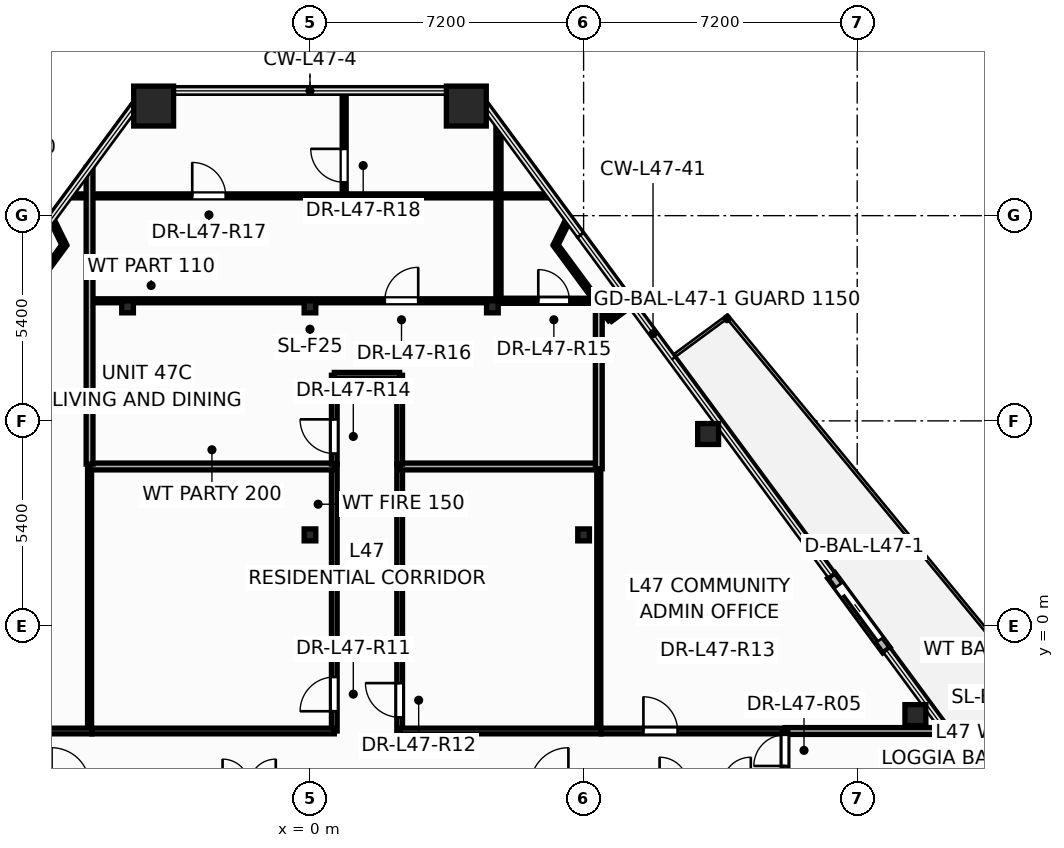
"""IFC4 building model, lengths in metres.
Left out: names, types, materials, properties, quantities, classifications, styles, units other than length and angle.
Written with IfcOpenShell. Run it as: python <this file> out.ifc"""

import sys

from ifc_helpers import new_model, si_unit, direction, frame, frame_2d, origin, origin_2d, place, context, subcontext, project, spatial, rectangle, hollow_rectangle, hollow_circle, i_section, extrude, element, fill, save


model = new_model("IFC4")
c1 = context("Model", 3, precision=1e-05, world=origin(), true_north=direction((0.0, 1.0)))
c2 = subcontext(c1, "Body", "Model", "MODEL_VIEW")
j1 = project(units=[si_unit("LENGTHUNIT", "METRE"), si_unit("PLANEANGLEUNIT", "RADIAN")], contexts=[c1])
p1 = place(None, origin())
s1 = spatial("IfcSite", under=j1, at=p1, CompositionType="ELEMENT")
p2 = place(p1, origin())
s2 = spatial("IfcBuilding", under=s1, at=p2, CompositionType="ELEMENT")
p3 = place(p2, frame((0.0, 0.0, 182.1)))
s3 = spatial("IfcBuildingStorey", under=s2, at=p3, CompositionType="ELEMENT", Elevation=182.1)
for number, where, z_axis, x_axis in (
    (1, (4.114, 13.684, 0.0), (0.0, 0.0, 1.0), (1.0, 0.0, 0.0)),
    (2, (-4.114, 13.684, 0.0), (0.0, 0.0, 1.0), (1.0, 0.0, 0.0)),
):
    element("IfcColumn", number, at=place(p3, frame(where, z_axis=z_axis, x_axis=x_axis)), inside=s3, PredefinedType="COLUMN", context=c2, shape_type="SweptSolid", body=[
        extrude(hollow_rectangle(XDim=1.05, YDim=1.05, WallThickness=0.045, at=origin_2d()), origin(), (0.0, 0.0, 1.0), 3.6),
    ])
for number, where, z_axis, x_axis in (
    (3, (15.931, -2.341, 0.0), (0.0, 0.0, 1.0), (1.0, 0.0, 0.0)),
    (4, (10.477, 5.055, 0.0), (0.0, 0.0, 1.0), (1.0, 0.0, 0.0)),
):
    element("IfcColumn", number, at=place(p3, frame(where, z_axis=z_axis, x_axis=x_axis)), inside=s3, PredefinedType="COLUMN", context=c2, shape_type="SweptSolid", body=[
        extrude(hollow_circle(Radius=0.275, WallThickness=0.024, at=origin_2d()), origin(), (0.0, 0.0, 1.0), 3.6),
    ])
for number, where, z_axis, x_axis in (
    (5, (0.0, 2.4, 0.0), (0.0, 0.0, 1.0), (1.0, 0.0, 0.0)),
    (6, (7.2, 2.4, 0.0), (0.0, 0.0, 1.0), (1.0, 0.0, 0.0)),
    (7, (-4.8, 8.4, 0.0), (0.0, 0.0, 1.0), (1.0, 0.0, 0.0)),
    (8, (0.0, 8.4, 0.0), (0.0, 0.0, 1.0), (1.0, 0.0, 0.0)),
    (9, (4.8, 8.4, 0.0), (0.0, 0.0, 1.0), (1.0, 0.0, 0.0)),
):
    element("IfcColumn", number, at=place(p3, frame(where, z_axis=z_axis, x_axis=x_axis)), inside=s3, PredefinedType="COLUMN", context=c2, shape_type="SweptSolid", body=[
        extrude(i_section(OverallWidth=0.307, OverallDepth=0.314, WebThickness=0.012, FlangeThickness=0.019, at=origin_2d()), origin(), (0.0, 0.0, 1.0), 3.6),
    ])
p4 = place(p3, frame((15.168, -0.633, -0.015), z_axis=(0.0, 0.0, 1.0), x_axis=(-0.593448168385, 0.804872208142, 0.0)))
e10 = element("IfcWall", 10, at=p4, inside=s3, PredefinedType="STANDARD", context=c2, shape_type="SweptSolid", body=[
    extrude(rectangle(XDim=2.44, YDim=0.24, at=frame_2d((1.22, 0.0))), origin(), (0.0, 0.0, 1.0), 2.807),
])
p5 = place(p4, frame((0.32, 0.0, 0.015)))
e11 = element("IfcOpeningElement", 11, at=p5, cuts=e10, PredefinedType="OPENING", context=c2, shape_type="SweptSolid", body=[
    extrude(rectangle(XDim=1.806, YDim=2.204, at=frame_2d((0.9, 1.102))), frame((0.0, 0.13, 0.0), z_axis=(0.0, -1.0, 0.0), x_axis=(1.0, 0.0, 0.0)), (0.0, 0.0, 1.0), 0.26),
])
p6 = place(p3, frame((-5.8, 8.56, 0.0), z_axis=(0.0, 0.0, 1.0), x_axis=(1.0, 0.0, 0.0)))
e12 = element("IfcWall", 12, at=p6, inside=s3, PredefinedType="PARTITIONING", context=c2, shape_type="SweptSolid", body=[
    extrude(rectangle(XDim=10.8, YDim=0.105, at=frame_2d((5.4, 0.0))), origin(), (0.0, 0.0, 1.0), 2.325),
])
p7 = place(p6, frame((7.768, 0.0, 0.0)))
e13 = element("IfcOpeningElement", 13, at=p7, cuts=e12, PredefinedType="OPENING", context=c2, shape_type="SweptSolid", body=[
    extrude(rectangle(XDim=0.886, YDim=2.104, at=frame_2d((0.44, 1.052))), frame((0.0, 0.062, 0.0), z_axis=(0.0, -1.0, 0.0), x_axis=(1.0, 0.0, 0.0)), (0.0, 0.0, 1.0), 0.125),
])
p8 = place(p3, frame((-6.354, 11.32, 0.0), z_axis=(0.0, 0.0, 1.0), x_axis=(1.0, 0.0, 0.0)))
e14 = element("IfcWall", 14, at=p8, inside=s3, PredefinedType="PARTITIONING", context=c2, shape_type="SweptSolid", body=[
    extrude(rectangle(XDim=7.314, YDim=0.105, at=frame_2d((3.657, 0.0))), origin(), (0.0, 0.0, 1.0), 2.325),
])
p9 = place(p8, frame((3.256, 0.0, 0.0)))
e15 = element("IfcOpeningElement", 15, at=p9, cuts=e14, PredefinedType="OPENING", context=c2, shape_type="SweptSolid", body=[
    extrude(rectangle(XDim=0.886, YDim=2.104, at=frame_2d((0.44, 1.052))), frame((0.0, 0.062, 0.0), z_axis=(0.0, -1.0, 0.0), x_axis=(1.0, 0.0, 0.0)), (0.0, 0.0, 1.0), 0.125),
])
p10 = place(p3, frame((0.64, -2.76, 0.0), z_axis=(0.0, 0.0, 1.0), x_axis=(0.0, 1.0, 0.0)))
e16 = element("IfcWall", 16, at=p10, inside=s3, PredefinedType="PARTITIONING", context=c2, shape_type="SweptSolid", body=[
    extrude(rectangle(XDim=7.02, YDim=0.15, at=frame_2d((3.51, 0.0))), origin(), (0.0, 0.0, 1.0), 2.325),
])
p11 = place(p10, frame((0.52, 0.0, 0.0)))
e17 = element("IfcOpeningElement", 17, at=p11, cuts=e16, PredefinedType="OPENING", context=c2, shape_type="SweptSolid", body=[
    extrude(rectangle(XDim=0.906, YDim=2.104, at=frame_2d((0.45, 1.052))), frame((0.0, 0.085, 0.0), z_axis=(0.0, -1.0, 0.0), x_axis=(1.0, 0.0, 0.0)), (0.0, 0.0, 1.0), 0.17),
])
p12 = place(p3, frame((2.36, -2.76, 0.0), z_axis=(0.0, 0.0, 1.0), x_axis=(0.0, 1.0, 0.0)))
e18 = element("IfcWall", 18, at=p12, inside=s3, PredefinedType="PARTITIONING", context=c2, shape_type="SweptSolid", body=[
    extrude(rectangle(XDim=7.02, YDim=0.15, at=frame_2d((3.51, 0.0))), origin(), (0.0, 0.0, 1.0), 2.325),
])
p13 = place(p12, frame((0.36, 0.0, 0.0)))
e19 = element("IfcOpeningElement", 19, at=p13, cuts=e18, PredefinedType="OPENING", context=c2, shape_type="SweptSolid", body=[
    extrude(rectangle(XDim=0.906, YDim=2.104, at=frame_2d((0.45, 1.052))), frame((0.0, 0.085, 0.0), z_axis=(0.0, -1.0, 0.0), x_axis=(1.0, 0.0, 0.0)), (0.0, 0.0, 1.0), 0.17),
])
p14 = place(p3, frame((-5.8, -2.76, 0.0), z_axis=(0.0, 0.0, 1.0), x_axis=(0.0, 1.0, 0.0)))
e20 = element("IfcWall", 20, at=p14, inside=s3, PredefinedType="PARTITIONING", context=c2, shape_type="SweptSolid", body=[
    extrude(rectangle(XDim=7.02, YDim=0.105, at=frame_2d((3.51, 0.0))), origin(), (0.0, 0.0, 1.0), 2.325),
])
p15 = place(p3, frame((7.6, -2.76, 0.0), z_axis=(0.0, 0.0, 1.0), x_axis=(0.0, 1.0, 0.0)))
e21 = element("IfcWall", 21, at=p15, inside=s3, PredefinedType="PARTITIONING", context=c2, shape_type="SweptSolid", body=[
    extrude(rectangle(XDim=6.96, YDim=0.105, at=frame_2d((3.48, 0.0))), origin(), (0.0, 0.0, 1.0), 2.325),
])
p16 = place(p3, frame((-12.5, -2.76, 0.0), z_axis=(0.0, 0.0, 1.0), x_axis=(1.0, 0.0, 0.0)))
e22 = element("IfcWall", 22, at=p16, inside=s3, PredefinedType="PARTITIONING", context=c2, shape_type="SweptSolid", body=[
    extrude(rectangle(XDim=6.76, YDim=0.15, at=frame_2d((3.38, 0.0))), origin(), (0.0, 0.0, 1.0), 2.325),
])
p17 = place(p16, frame((1.675, 0.0, 0.0)))
e23 = element("IfcOpeningElement", 23, at=p17, cuts=e22, PredefinedType="OPENING", context=c2, shape_type="SweptSolid", body=[
    extrude(rectangle(XDim=0.906, YDim=2.104, at=frame_2d((0.45, 1.052))), frame((0.0, 0.085, 0.0), z_axis=(0.0, -1.0, 0.0), x_axis=(1.0, 0.0, 0.0)), (0.0, 0.0, 1.0), 0.17),
])
p18 = place(p3, frame((-5.738, -2.76, 0.0), z_axis=(0.0, 0.0, 1.0), x_axis=(1.0, 0.0, 0.0)))
e24 = element("IfcWall", 24, at=p18, inside=s3, PredefinedType="PARTITIONING", context=c2, shape_type="SweptSolid", body=[
    extrude(rectangle(XDim=6.378, YDim=0.15, at=frame_2d((3.189, 0.0))), origin(), (0.0, 0.0, 1.0), 2.325),
])
p19 = place(p3, frame((-5.8, 4.2, 0.0), z_axis=(0.0, 0.0, 1.0), x_axis=(1.0, 0.0, 0.0)))
e25 = element("IfcWall", 25, at=p19, inside=s3, PredefinedType="PARTITIONING", context=c2, shape_type="SweptSolid", body=[
    extrude(rectangle(XDim=6.44, YDim=0.18, at=frame_2d((3.22, 0.0))), origin(), (0.0, 0.0, 1.0), 2.325),
])
p20 = place(p3, frame((0.962, 11.32, 0.0), z_axis=(0.0, 0.0, 1.0), x_axis=(1.0, 0.0, 0.0)))
e26 = element("IfcWall", 26, at=p20, inside=s3, PredefinedType="PARTITIONING", context=c2, shape_type="SweptSolid", body=[
    extrude(rectangle(XDim=5.392, YDim=0.105, at=frame_2d((2.696, 0.0))), origin(), (0.0, 0.0, 1.0), 2.325),
])
p21 = place(p3, frame((2.36, -2.76, 0.0), z_axis=(0.0, 0.0, 1.0), x_axis=(1.0, 0.0, 0.0)))
e27 = element("IfcWall", 27, at=p21, inside=s3, PredefinedType="PARTITIONING", context=c2, shape_type="SweptSolid", body=[
    extrude(rectangle(XDim=5.3, YDim=0.15, at=frame_2d((2.65, 0.0))), origin(), (0.0, 0.0, 1.0), 2.325),
])
p22 = place(p3, frame((2.36, 4.2, 0.0), z_axis=(0.0, 0.0, 1.0), x_axis=(1.0, 0.0, 0.0)))
e28 = element("IfcWall", 28, at=p22, inside=s3, PredefinedType="PARTITIONING", context=c2, shape_type="SweptSolid", body=[
    extrude(rectangle(XDim=5.24, YDim=0.18, at=frame_2d((2.62, 0.0))), origin(), (0.0, 0.0, 1.0), 2.325),
])
p23 = place(p3, frame((7.662, -2.76, 0.0), z_axis=(0.0, 0.0, 1.0), x_axis=(1.0, 0.0, 0.0)))
e29 = element("IfcWall", 29, at=p23, inside=s3, PredefinedType="PARTITIONING", context=c2, shape_type="SweptSolid", body=[
    extrude(rectangle(XDim=4.838, YDim=0.15, at=frame_2d((2.419, 0.0))), origin(), (0.0, 0.0, 1.0), 3.35),
])
p24 = place(p23, frame((1.112, 0.0, 0.0)))
e30 = element("IfcOpeningElement", 30, at=p24, cuts=e29, PredefinedType="OPENING", context=c2, shape_type="SweptSolid", body=[
    extrude(rectangle(XDim=0.906, YDim=2.104, at=frame_2d((0.45, 1.052))), frame((0.0, 0.085, 0.0), z_axis=(0.0, -1.0, 0.0), x_axis=(1.0, 0.0, 0.0)), (0.0, 0.0, 1.0), 0.17),
])
p25 = place(p3, frame((4.96, 8.56, 0.0), z_axis=(0.0, 0.0, 1.0), x_axis=(0.0, 1.0, 0.0)))
e31 = element("IfcWall", 31, at=p25, inside=s3, PredefinedType="PARTITIONING", context=c2, shape_type="SweptSolid", body=[
    extrude(rectangle(XDim=4.65, YDim=0.135, at=frame_2d((2.325, 0.0))), origin(), (0.0, 0.0, 1.0), 2.325),
])
p26 = place(p3, frame((7.6, 4.14, 0.0), z_axis=(0.0, 0.0, 1.0), x_axis=(0.0, 1.0, 0.0)))
e32 = element("IfcWall", 32, at=p26, inside=s3, PredefinedType="PARTITIONING", context=c2, shape_type="SweptSolid", body=[
    extrude(rectangle(XDim=4.56, YDim=0.18, at=frame_2d((2.28, 0.0))), origin(), (0.0, 0.0, 1.0), 2.325),
])
p27 = place(p3, frame((-5.8, 4.262, 0.0), z_axis=(0.0, 0.0, 1.0), x_axis=(0.0, 1.0, 0.0)))
e33 = element("IfcWall", 33, at=p27, inside=s3, PredefinedType="PARTITIONING", context=c2, shape_type="SweptSolid", body=[
    extrude(rectangle(XDim=7.809, YDim=0.18, at=frame_2d((3.905, 0.0))), origin(), (0.0, 0.0, 1.0), 2.325),
])
p28 = place(p3, frame((12.5, -2.76, 0.0), z_axis=(0.0, 0.0, 1.0), x_axis=(1.0, 0.0, 0.0)))
e34 = element("IfcWall", 34, at=p28, inside=s3, PredefinedType="PARTITIONING", context=c2, shape_type="SweptSolid", body=[
    extrude(rectangle(XDim=4.237, YDim=0.18, at=frame_2d((2.118, 0.0))), origin(), (0.0, 0.0, 1.0), 2.325),
])
p29 = place(p3, frame((5.002, 8.56, 0.0), z_axis=(0.0, 0.0, 1.0), x_axis=(1.0, 0.0, 0.0)))
e35 = element("IfcWall", 35, at=p29, inside=s3, PredefinedType="PARTITIONING", context=c2, shape_type="SweptSolid", body=[
    extrude(rectangle(XDim=2.758, YDim=0.135, at=frame_2d((1.379, 0.0))), origin(), (0.0, 0.0, 1.0), 2.325),
])
p30 = place(p29, frame((1.006, 0.0, 0.0)))
e36 = element("IfcOpeningElement", 36, at=p30, cuts=e35, PredefinedType="OPENING", context=c2, shape_type="SweptSolid", body=[
    extrude(rectangle(XDim=0.826, YDim=2.104, at=frame_2d((0.41, 1.052))), frame((0.0, 0.078, 0.0), z_axis=(0.0, -1.0, 0.0), x_axis=(1.0, 0.0, 0.0)), (0.0, 0.0, 1.0), 0.155),
])
p31 = place(p3, frame((0.9, 11.32, 0.0), z_axis=(0.0, 0.0, 1.0), x_axis=(0.0, 1.0, 0.0)))
e37 = element("IfcWall", 37, at=p31, inside=s3, PredefinedType="PARTITIONING", context=c2, shape_type="SweptSolid", body=[
    extrude(rectangle(XDim=2.763, YDim=0.105, at=frame_2d((1.382, 0.0))), origin(), (0.0, 0.0, 1.0), 2.325),
])
p32 = place(p31, frame((0.358, 0.0, 0.0)))
e38 = element("IfcOpeningElement", 38, at=p32, cuts=e37, PredefinedType="OPENING", context=c2, shape_type="SweptSolid", body=[
    extrude(rectangle(XDim=0.886, YDim=2.104, at=frame_2d((0.44, 1.052))), frame((0.0, 0.062, 0.0), z_axis=(0.0, -1.0, 0.0), x_axis=(1.0, 0.0, 0.0)), (0.0, 0.0, 1.0), 0.125),
])
p33 = place(p3, frame((0.64, 4.262, 0.0), z_axis=(0.0, 0.0, 1.0), x_axis=(0.0, 1.0, 0.0)))
e39 = element("IfcWall", 39, at=p33, inside=s3, PredefinedType="PARTITIONING", context=c2, shape_type="SweptSolid", body=[
    extrude(rectangle(XDim=2.338, YDim=0.15, at=frame_2d((1.169, 0.0))), origin(), (0.0, 0.0, 1.0), 3.35),
])
p34 = place(p33, frame((0.278, 0.0, 0.0)))
e40 = element("IfcOpeningElement", 40, at=p34, cuts=e39, PredefinedType="OPENING", context=c2, shape_type="SweptSolid", body=[
    extrude(rectangle(XDim=0.906, YDim=2.104, at=frame_2d((0.45, 1.052))), frame((0.0, 0.085, 0.0), z_axis=(0.0, -1.0, 0.0), x_axis=(1.0, 0.0, 0.0)), (0.0, 0.0, 1.0), 0.17),
])
p35 = place(p3, frame((2.36, 4.262, 0.0), z_axis=(0.0, 0.0, 1.0), x_axis=(0.0, 1.0, 0.0)))
e41 = element("IfcWall", 41, at=p35, inside=s3, PredefinedType="PARTITIONING", context=c2, shape_type="SweptSolid", body=[
    extrude(rectangle(XDim=2.338, YDim=0.15, at=frame_2d((1.169, 0.0))), origin(), (0.0, 0.0, 1.0), 2.969),
])
for number, where, z_axis, x_axis in (
    (42, (-6.463, 10.027, 0.0), (0.0, 0.0, 1.0), (-0.593, -0.805, 0.0)),
    (43, (7.905, 8.071, 0.0), (0.0, 0.0, 1.0), (-0.593, 0.805, 0.0)),
):
    element("IfcWall", number, at=place(p3, frame(where, z_axis=z_axis, x_axis=x_axis)), inside=s3, PredefinedType="PARTITIONING", context=c2, shape_type="SweptSolid", body=[
        extrude(rectangle(XDim=2.43, YDim=0.12, at=frame_2d((1.215, 0.0))), origin(), (0.0, 0.0, 1.0), 3.35),
    ])
p36 = place(p3, frame((0.64, 6.6, 0.0), z_axis=(0.0, 0.0, 1.0), x_axis=(1.0, 0.0, 0.0)))
e44 = element("IfcWall", 44, at=p36, inside=s3, PredefinedType="PARTITIONING", context=c2, shape_type="SweptSolid", body=[
    extrude(rectangle(XDim=1.72, YDim=0.15, at=frame_2d((0.86, 0.0))), origin(), (0.0, 0.0, 1.0), 2.969),
])
p37 = place(p3, frame((12.5, -4.24, 0.0), z_axis=(0.0, 0.0, 1.0), x_axis=(0.0, 1.0, 0.0)))
e45 = element("IfcWall", 45, at=p37, inside=s3, PredefinedType="PARTITIONING", context=c2, shape_type="SweptSolid", body=[
    extrude(rectangle(XDim=1.48, YDim=0.15, at=frame_2d((0.74, 0.0))), origin(), (0.0, 0.0, 1.0), 2.325),
])
p38 = place(p37, frame((0.56, 0.0, 0.0)))
e46 = element("IfcOpeningElement", 46, at=p38, cuts=e45, PredefinedType="OPENING", context=c2, shape_type="SweptSolid", body=[
    extrude(rectangle(XDim=0.826, YDim=2.104, at=frame_2d((0.41, 1.052))), frame((0.0, 0.085, 0.0), z_axis=(0.0, -1.0, 0.0), x_axis=(1.0, 0.0, 0.0)), (0.0, 0.0, 1.0), 0.17),
])
for number, where, z_axis, x_axis in (
    (47, (-6.797, 10.703, 0.0), (0.0, 0.0, 1.0), (0.443, -0.897, 0.0)),
    (48, (6.463, 10.027, 0.0), (0.0, 0.0, 1.0), (0.443, 0.897, 0.0)),
):
    element("IfcWall", number, at=place(p3, frame(where, z_axis=z_axis, x_axis=x_axis)), inside=s3, PredefinedType="PARTITIONING", context=c2, shape_type="SweptSolid", body=[
        extrude(rectangle(XDim=0.754, YDim=0.12, at=frame_2d((0.377, 0.0))), origin(), (0.0, 0.0, 1.0), 2.792),
    ])
p39 = place(p3, frame((8.444, 8.469, 0.0), z_axis=(0.0, 0.0, 1.0), x_axis=(-0.804698441933, -0.59368376898, 0.0)))
e49 = element("IfcWall", 49, at=p39, inside=s3, PredefinedType="PARTITIONING", context=c2, shape_type="SweptSolid", body=[
    extrude(rectangle(XDim=0.67, YDim=0.12, at=frame_2d((0.335, 0.0))), origin(), (0.0, 0.0, 1.0), 2.792),
])
p40 = place(p5, origin())
e50 = element("IfcDoor", 50, at=p40, inside=s3, OperationType="SLIDING_TO_LEFT", PredefinedType="DOOR", context=c2, shape_type="SweptSolid", body=[
    extrude(rectangle(XDim=1.8, YDim=2.2, at=frame_2d((0.9, 1.1))), frame((0.0, 0.025, 0.0), z_axis=(0.0, -1.0, 0.0), x_axis=(1.0, 0.0, 0.0)), (0.0, 0.0, 1.0), 0.05),
])
fill(e11, e50)
p41 = place(p38, origin())
e51 = element("IfcDoor", 51, at=p41, inside=s3, OperationType="SINGLE_SWING_LEFT", PredefinedType="DOOR", context=c2, shape_type="SweptSolid", body=[
    extrude(rectangle(XDim=0.82, YDim=2.1, at=frame_2d((0.41, 1.05))), frame((0.0, 0.025, 0.0), z_axis=(0.0, -1.0, 0.0), x_axis=(1.0, 0.0, 0.0)), (0.0, 0.0, 1.0), 0.05),
])
fill(e46, e51)
p42 = place(p11, origin())
e52 = element("IfcDoor", 52, at=p42, inside=s3, OperationType="SINGLE_SWING_LEFT", PredefinedType="DOOR", context=c2, shape_type="SweptSolid", body=[
    extrude(rectangle(XDim=0.9, YDim=2.1, at=frame_2d((0.45, 1.05))), frame((0.0, 0.025, 0.0), z_axis=(0.0, -1.0, 0.0), x_axis=(1.0, 0.0, 0.0)), (0.0, 0.0, 1.0), 0.05),
])
fill(e17, e52)
p43 = place(p13, origin())
e53 = element("IfcDoor", 53, at=p43, inside=s3, OperationType="SINGLE_SWING_RIGHT", PredefinedType="DOOR", context=c2, shape_type="SweptSolid", body=[
    extrude(rectangle(XDim=0.9, YDim=2.1, at=frame_2d((0.45, 1.05))), frame((0.0, 0.025, 0.0), z_axis=(0.0, -1.0, 0.0), x_axis=(1.0, 0.0, 0.0)), (0.0, 0.0, 1.0), 0.05),
])
fill(e19, e53)
p44 = place(p24, origin())
e54 = element("IfcDoor", 54, at=p44, inside=s3, OperationType="SINGLE_SWING_LEFT", PredefinedType="DOOR", context=c2, shape_type="SweptSolid", body=[
    extrude(rectangle(XDim=0.9, YDim=2.1, at=frame_2d((0.45, 1.05))), frame((0.0, 0.025, 0.0), z_axis=(0.0, -1.0, 0.0), x_axis=(1.0, 0.0, 0.0)), (0.0, 0.0, 1.0), 0.05),
])
fill(e30, e54)
p45 = place(p34, origin())
e55 = element("IfcDoor", 55, at=p45, inside=s3, OperationType="SINGLE_SWING_RIGHT", PredefinedType="DOOR", context=c2, shape_type="SweptSolid", body=[
    extrude(rectangle(XDim=0.9, YDim=2.1, at=frame_2d((0.45, 1.05))), frame((0.0, 0.025, 0.0), z_axis=(0.0, -1.0, 0.0), x_axis=(1.0, 0.0, 0.0)), (0.0, 0.0, 1.0), 0.05),
])
fill(e40, e55)
p46 = place(p30, origin())
e56 = element("IfcDoor", 56, at=p46, inside=s3, OperationType="SINGLE_SWING_LEFT", PredefinedType="DOOR", context=c2, shape_type="SweptSolid", body=[
    extrude(rectangle(XDim=0.82, YDim=2.1, at=frame_2d((0.41, 1.05))), frame((0.0, 0.025, 0.0), z_axis=(0.0, -1.0, 0.0), x_axis=(1.0, 0.0, 0.0)), (0.0, 0.0, 1.0), 0.05),
])
fill(e36, e56)
p47 = place(p7, origin())
e57 = element("IfcDoor", 57, at=p47, inside=s3, OperationType="SINGLE_SWING_RIGHT", PredefinedType="DOOR", context=c2, shape_type="SweptSolid", body=[
    extrude(rectangle(XDim=0.88, YDim=2.1, at=frame_2d((0.44, 1.05))), frame((0.0, 0.025, 0.0), z_axis=(0.0, -1.0, 0.0), x_axis=(1.0, 0.0, 0.0)), (0.0, 0.0, 1.0), 0.05),
])
fill(e13, e57)
p48 = place(p9, origin())
e58 = element("IfcDoor", 58, at=p48, inside=s3, OperationType="SINGLE_SWING_LEFT", PredefinedType="DOOR", context=c2, shape_type="SweptSolid", body=[
    extrude(rectangle(XDim=0.88, YDim=2.1, at=frame_2d((0.44, 1.05))), frame((0.0, 0.025, 0.0), z_axis=(0.0, -1.0, 0.0), x_axis=(1.0, 0.0, 0.0)), (0.0, 0.0, 1.0), 0.05),
])
fill(e15, e58)
p49 = place(p32, origin())
e59 = element("IfcDoor", 59, at=p49, inside=s3, OperationType="SINGLE_SWING_RIGHT", PredefinedType="DOOR", context=c2, shape_type="SweptSolid", body=[
    extrude(rectangle(XDim=0.88, YDim=2.1, at=frame_2d((0.44, 1.05))), frame((0.0, 0.025, 0.0), z_axis=(0.0, -1.0, 0.0), x_axis=(1.0, 0.0, 0.0)), (0.0, 0.0, 1.0), 0.05),
])
fill(e38, e59)
save(model, sys.argv[1])
